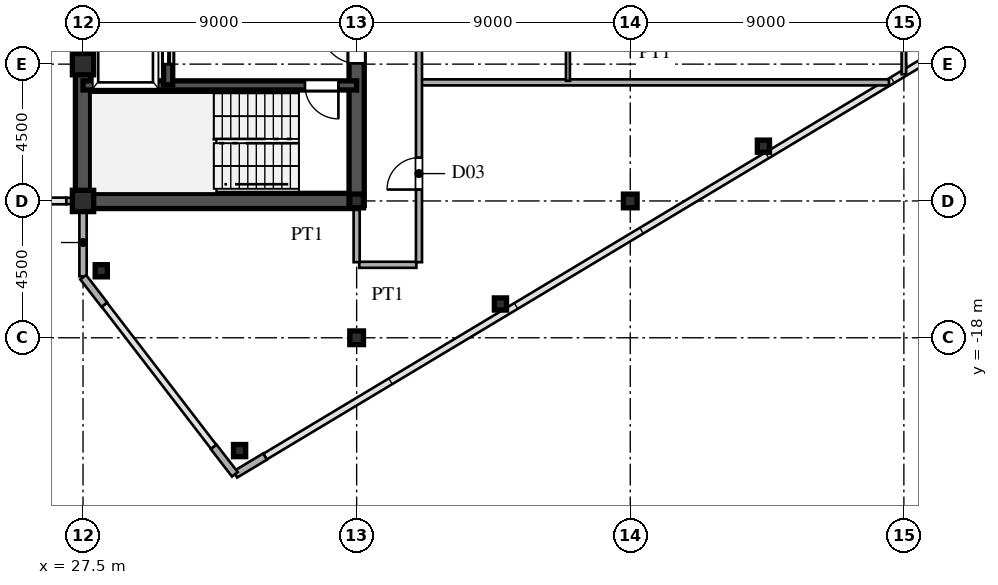
"""IFC4 building model, lengths in metres.
Left out: names, types, materials, properties, quantities, classifications, styles, units other than length and angle.
Written with IfcOpenShell. Run it as: python <this file> out.ifc"""

import sys

from ifc_helpers import new_model, si_unit, direction, frame, frame_2d, origin, origin_2d, place, context, subcontext, project, spatial, rectangle, hollow_rectangle, i_section, extrude, source, transform, mapped, element, fill, save


model = new_model("IFC4")
c1 = context("Model", 3, precision=1e-05, world=origin(), true_north=direction((0.0, 1.0)))
c2 = subcontext(c1, "Body", "Model", "MODEL_VIEW")
j1 = project(units=[si_unit("LENGTHUNIT", "METRE"), si_unit("PLANEANGLEUNIT", "RADIAN")], contexts=[c1])
p1 = place(None, origin())
s1 = spatial("IfcSite", under=j1, at=p1, CompositionType="ELEMENT")
p2 = place(p1, origin())
s2 = spatial("IfcBuilding", under=s1, at=p2, CompositionType="ELEMENT")
p3 = place(p2, frame((0.0, 0.0, 261.9)))
s3 = spatial("IfcBuildingStorey", under=s2, at=p3, CompositionType="ELEMENT", Elevation=261.9)
m1 = source(origin(), c2, "Body", "SweptSolid", [
    extrude(hollow_rectangle(XDim=0.7, YDim=0.7, WallThickness=0.03, at=origin_2d()), origin(), (0.0, 0.0, 1.0), 3.75),
])
for number, where, z_axis, x_axis in (
    (1, (27.5, -13.5, 0.0), (0.0, 0.0, 1.0), (1.0, 0.0, 0.0)),
    (2, (27.5, -9.0, 0.0), (0.0, 0.0, 1.0), (1.0, 0.0, 0.0)),
):
    element("IfcColumn", number, at=place(p3, frame(where, z_axis=z_axis, x_axis=x_axis)), inside=s3, PredefinedType="COLUMN", context=c2, shape_type="MappedRepresentation", body=[
        mapped(m1, transform((0.0, 0.0, 0.0), scale=1.0)),
    ])
m2 = source(origin(), c2, "Body", "SweptSolid", [
    extrude(i_section(OverallWidth=0.45, OverallDepth=0.45, WebThickness=0.016, FlangeThickness=0.025, at=origin_2d()), origin(), (0.0, 0.0, 1.0), 3.75),
])
for number, where, z_axis, x_axis in (
    (3, (36.5, -18.0, 0.0), (0.0, 0.0, 1.0), (1.0, 0.0, 0.0)),
    (4, (36.5, -13.5, 0.0), (0.0, 0.0, 1.0), (1.0, 0.0, 0.0)),
    (5, (45.5, -13.5, 0.0), (0.0, 0.0, 1.0), (1.0, 0.0, 0.0)),
):
    element("IfcColumn", number, at=place(p3, frame(where, z_axis=z_axis, x_axis=x_axis)), inside=s3, PredefinedType="COLUMN", context=c2, shape_type="MappedRepresentation", body=[
        mapped(m2, transform((0.0, 0.0, 0.0), scale=1.0)),
    ])
m3 = source(origin(), c2, "Body", "SweptSolid", [
    extrude(hollow_rectangle(XDim=0.4, YDim=0.4, WallThickness=0.016, at=origin_2d()), origin(), (0.0, 0.0, 1.0), 3.75),
])
for number, where, z_axis, x_axis in (
    (6, (32.65, -21.71, 0.0), (0.0, 0.0, 1.0), (1.0, 0.0, 0.0)),
    (7, (28.1, -15.796, 0.0), (0.0, 0.0, 1.0), (1.0, 0.0, 0.0)),
    (8, (41.23, -16.889, 0.0), (0.0, 0.0, 1.0), (1.0, 0.0, 0.0)),
    (9, (49.88, -11.699, 0.0), (0.0, 0.0, 1.0), (1.0, 0.0, 0.0)),
):
    element("IfcColumn", number, at=place(p3, frame(where, z_axis=z_axis, x_axis=x_axis)), inside=s3, PredefinedType="COLUMN", context=c2, shape_type="MappedRepresentation", body=[
        mapped(m3, transform((0.0, 0.0, 0.0), scale=1.0)),
    ])
p4 = place(p3, frame((32.509, -22.495, 0.0), z_axis=(0.0, 0.0, 1.0), x_axis=(0.85743623509, 0.514590228002, 0.0)))
e10 = element("IfcWall", 10, at=p4, inside=s3, PredefinedType="SOLIDWALL", context=c2, shape_type="SweptSolid", body=[
    extrude(rectangle(XDim=1.14, YDim=0.24, at=frame_2d((0.57, 0.0))), origin(), (0.0, 0.0, 1.0), 3.53),
])
p5 = place(p3, frame((27.5, -15.98, 0.0), z_axis=(0.0, 0.0, 1.0), x_axis=(0.0, 1.0, 0.0)))
e11 = element("IfcWall", 11, at=p5, inside=s3, PredefinedType="SOLIDWALL", context=c2, shape_type="SweptSolid", body=[
    extrude(rectangle(XDim=1.605, YDim=0.24, at=frame_2d((0.803, 0.0))), origin(), (0.0, 0.0, 1.0), 3.53),
])
p6 = place(p3, frame((27.5, -14.375, 0.0), z_axis=(0.0, 0.0, 1.0), x_axis=(0.0, 1.0, 0.0)))
e12 = element("IfcWall", 12, at=p6, inside=s3, PredefinedType="SOLIDWALL", context=c2, shape_type="SweptSolid", body=[
    extrude(rectangle(XDim=0.62, YDim=0.24, at=frame_2d((0.31, 0.0))), origin(), (0.0, 0.0, 1.0), 3.03),
])
for number, where, z_axis, x_axis in (
    (13, (27.506, -16.008, 0.0), (0.0, 0.0, 1.0), (0.61, -0.793, 0.0)),
    (14, (31.799, -21.588, 0.0), (0.0, 0.0, 1.0), (0.61, -0.793, 0.0)),
):
    element("IfcWall", number, at=place(p3, frame(where, z_axis=z_axis, x_axis=x_axis)), inside=s3, PredefinedType="SOLIDWALL", context=c2, shape_type="SweptSolid", body=[
        extrude(rectangle(XDim=1.14, YDim=0.24, at=frame_2d((0.57, 0.0))), origin(), (0.0, 0.0, 1.0), 3.53),
    ])
p7 = place(p3, frame((26.95, -13.5, 0.0), z_axis=(0.0, 0.0, 1.0), x_axis=(1.0, 0.0, 0.0)))
e15 = element("IfcWall", 15, at=p7, inside=s3, PredefinedType="SOLIDWALL", context=c2, shape_type="SweptSolid", body=[
    extrude(rectangle(XDim=0.54, YDim=0.21, at=frame_2d((0.27, 0.0))), origin(), (0.0, 0.0, 1.0), 3.03),
])
p8 = place(p3, frame((27.5, -13.5, 0.0), z_axis=(0.0, 0.0, 1.0), x_axis=(0.0, 1.0, 0.0)))
e16 = element("IfcWall", 16, at=p8, inside=s3, PredefinedType="SHEAR", context=c2, shape_type="SweptSolid", body=[
    extrude(rectangle(XDim=12.2, YDim=0.5, at=frame_2d((6.1, 0.0))), origin(), (0.0, 0.0, 1.0), 3.53),
])
p9 = place(p3, frame((27.5, -13.5, 0.0), z_axis=(0.0, 0.0, 1.0), x_axis=(1.0, 0.0, 0.0)))
e17 = element("IfcWall", 17, at=p9, inside=s3, PredefinedType="SHEAR", context=c2, shape_type="SweptSolid", body=[
    extrude(rectangle(XDim=9.0, YDim=0.5, at=frame_2d((4.5, 0.0))), origin(), (0.0, 0.0, 1.0), 3.53),
])
p10 = place(p3, frame((36.5, -13.65, 0.0), z_axis=(0.0, 0.0, 1.0), x_axis=(0.0, 1.0, 0.0)))
e18 = element("IfcWall", 18, at=p10, inside=s3, PredefinedType="SHEAR", context=c2, shape_type="SweptSolid", body=[
    extrude(rectangle(XDim=7.15, YDim=0.5, at=frame_2d((3.575, 0.0))), origin(), (0.0, 0.0, 1.0), 3.53),
])
p11 = place(p10, frame((4.675, 0.0, 0.0)))
e19 = element("IfcOpeningElement", 19, at=p11, cuts=e18, PredefinedType="OPENING", context=c2, shape_type="SweptSolid", body=[
    extrude(rectangle(XDim=1.15, YDim=2.2, at=frame_2d((0.575, 1.1))), frame((0.0, 0.26, 0.0), z_axis=(0.0, -1.0, 0.0), x_axis=(1.0, 0.0, 0.0)), (0.0, 0.0, 1.0), 0.52),
])
p12 = place(p3, frame((27.5, -9.7, 0.0), z_axis=(0.0, 0.0, 1.0), x_axis=(1.0, 0.0, 0.0)))
e20 = element("IfcWall", 20, at=p12, inside=s3, PredefinedType="SHEAR", context=c2, shape_type="SweptSolid", body=[
    extrude(rectangle(XDim=9.0, YDim=0.3, at=frame_2d((4.5, 0.0))), origin(), (0.0, 0.0, 1.0), 3.53),
])
p13 = place(p12, frame((7.3, 0.0, 0.0)))
e21 = element("IfcOpeningElement", 21, at=p13, cuts=e20, PredefinedType="OPENING", context=c2, shape_type="SweptSolid", body=[
    extrude(rectangle(XDim=1.1, YDim=2.2, at=frame_2d((0.55, 1.1))), frame((0.0, 0.16, 0.0), z_axis=(0.0, -1.0, 0.0), x_axis=(1.0, 0.0, 0.0)), (0.0, 0.0, 1.0), 0.32),
])
p14 = place(p3, frame((30.3, -9.68, 0.0), z_axis=(0.0, 0.0, 1.0), x_axis=(0.0, 1.0, 0.0)))
e22 = element("IfcWall", 22, at=p14, inside=s3, PredefinedType="SHEAR", context=c2, shape_type="SweptSolid", body=[
    extrude(rectangle(XDim=2.56, YDim=0.3, at=frame_2d((1.28, 0.0))), origin(), (0.0, 0.0, 1.0), 3.53),
])
p15 = place(p14, frame((0.68, 0.0, 0.0)))
e23 = element("IfcOpeningElement", 23, at=p15, cuts=e22, PredefinedType="OPENING", context=c2, shape_type="SweptSolid", body=[
    extrude(rectangle(XDim=1.2, YDim=2.25, at=frame_2d((0.6, 1.125))), frame((0.0, 0.16, 0.0), z_axis=(0.0, -1.0, 0.0), x_axis=(1.0, 0.0, 0.0)), (0.0, 0.0, 1.0), 0.32),
])
p16 = place(p3, frame((36.585, -15.6, 0.0), z_axis=(0.0, 0.0, 1.0), x_axis=(1.0, 0.0, 0.0)))
e24 = element("IfcWall", 24, at=p16, inside=s3, PredefinedType="PARTITIONING", context=c2, shape_type="SweptSolid", body=[
    extrude(rectangle(XDim=1.88, YDim=0.2, at=frame_2d((0.94, 0.0))), origin(), (0.0, 0.0, 1.0), 3.53),
])
p17 = place(p3, frame((38.63, -9.6, 0.0), z_axis=(0.0, 0.0, 1.0), x_axis=(1.0, 0.0, 0.0)))
e25 = element("IfcWall", 25, at=p17, inside=s3, PredefinedType="PARTITIONING", context=c2, shape_type="SweptSolid", body=[
    extrude(rectangle(XDim=15.38, YDim=0.2, at=frame_2d((7.69, 0.0))), origin(), (0.0, 0.0, 1.0), 3.53),
])
p18 = place(p3, frame((36.5, -15.515, 0.0), z_axis=(0.0, 0.0, 1.0), x_axis=(0.0, 1.0, 0.0)))
e26 = element("IfcWall", 26, at=p18, inside=s3, PredefinedType="PARTITIONING", context=c2, shape_type="SweptSolid", body=[
    extrude(rectangle(XDim=1.76, YDim=0.2, at=frame_2d((0.88, 0.0))), origin(), (0.0, 0.0, 1.0), 2.93),
])
p19 = place(p3, frame((38.55, -15.515, 0.0), z_axis=(0.0, 0.0, 1.0), x_axis=(0.0, 1.0, 0.0)))
e27 = element("IfcWall", 27, at=p19, inside=s3, PredefinedType="PARTITIONING", context=c2, shape_type="SweptSolid", body=[
    extrude(rectangle(XDim=31.03, YDim=0.2, at=frame_2d((15.515, 0.0))), origin(), (0.0, 0.0, 1.0), 3.53),
])
p20 = place(p19, frame((2.39, 0.0, 0.0)))
e28 = element("IfcOpeningElement", 28, at=p20, cuts=e27, PredefinedType="OPENING", context=c2, shape_type="SweptSolid", body=[
    extrude(rectangle(XDim=1.05, YDim=2.25, at=frame_2d((0.525, 1.125))), frame((0.0, 0.11, 0.0), z_axis=(0.0, -1.0, 0.0), x_axis=(1.0, 0.0, 0.0)), (0.0, 0.0, 1.0), 0.22),
])
p21 = place(p19, frame((11.889, 0.0, 0.0)))
e29 = element("IfcOpeningElement", 29, at=p21, cuts=e27, PredefinedType="OPENING", context=c2, shape_type="SweptSolid", body=[
    extrude(rectangle(XDim=1.05, YDim=2.25, at=frame_2d((0.525, 1.125))), frame((0.0, 0.11, 0.0), z_axis=(0.0, -1.0, 0.0), x_axis=(1.0, 0.0, 0.0)), (0.0, 0.0, 1.0), 0.22),
])
p22 = place(p19, frame((24.69, 0.0, 0.0)))
e30 = element("IfcOpeningElement", 30, at=p22, cuts=e27, PredefinedType="OPENING", context=c2, shape_type="SweptSolid", body=[
    extrude(rectangle(XDim=1.05, YDim=2.25, at=frame_2d((0.525, 1.125))), frame((0.0, 0.11, 0.0), z_axis=(0.0, -1.0, 0.0), x_axis=(1.0, 0.0, 0.0)), (0.0, 0.0, 1.0), 0.22),
])
p23 = place(p3, frame((43.45, -9.55, 0.0), z_axis=(0.0, 0.0, 1.0), x_axis=(0.0, 1.0, 0.0)))
e31 = element("IfcWall", 31, at=p23, inside=s3, PredefinedType="PARTITIONING", context=c2, shape_type="SweptSolid", body=[
    extrude(rectangle(XDim=8.833, YDim=0.13, at=frame_2d((4.417, 0.0))), origin(), (0.0, 0.0, 1.0), 3.53),
])
p24 = place(p23, frame((6.175, 0.0, 0.0)))
e32 = element("IfcOpeningElement", 32, at=p24, cuts=e31, PredefinedType="OPENING", context=c2, shape_type="SweptSolid", body=[
    extrude(rectangle(XDim=0.95, YDim=2.15, at=frame_2d((0.475, 1.075))), frame((0.0, 0.075, 0.0), z_axis=(0.0, -1.0, 0.0), x_axis=(1.0, 0.0, 0.0)), (0.0, 0.0, 1.0), 0.15),
])
p25 = place(p3, frame((54.5, -9.335, 0.0), z_axis=(0.0, 0.0, 1.0), x_axis=(0.0, 1.0, 0.0)))
e33 = element("IfcWall", 33, at=p25, inside=s3, PredefinedType="PARTITIONING", context=c2, shape_type="SweptSolid", body=[
    extrude(rectangle(XDim=13.085, YDim=0.15, at=frame_2d((6.542, 0.0))), origin(), (0.0, 0.0, 1.0), 2.93),
])
p26 = place(p25, frame((5.96, 0.0, 0.0)))
e34 = element("IfcOpeningElement", 34, at=p26, cuts=e33, PredefinedType="OPENING", context=c2, shape_type="SweptSolid", body=[
    extrude(rectangle(XDim=0.95, YDim=2.15, at=frame_2d((0.475, 1.075))), frame((0.0, 0.085, 0.0), z_axis=(0.0, -1.0, 0.0), x_axis=(1.0, 0.0, 0.0)), (0.0, 0.0, 1.0), 0.17),
])
p27 = place(p25, frame((1.643, 0.0, 0.0)))
e35 = element("IfcOpeningElement", 35, at=p27, cuts=e33, PredefinedType="OPENING", context=c2, shape_type="SweptSolid", body=[
    extrude(rectangle(XDim=0.95, YDim=2.15, at=frame_2d((0.475, 1.075))), frame((0.0, 0.085, 0.0), z_axis=(0.0, -1.0, 0.0), x_axis=(1.0, 0.0, 0.0)), (0.0, 0.0, 1.0), 0.17),
])
p28 = place(p25, frame((10.427, 0.0, 0.0)))
e36 = element("IfcOpeningElement", 36, at=p28, cuts=e33, PredefinedType="OPENING", context=c2, shape_type="SweptSolid", body=[
    extrude(rectangle(XDim=0.95, YDim=2.15, at=frame_2d((0.475, 1.075))), frame((0.0, 0.085, 0.0), z_axis=(0.0, -1.0, 0.0), x_axis=(1.0, 0.0, 0.0)), (0.0, 0.0, 1.0), 0.17),
])
m4 = source(origin(), c2, "Body", "SweptSolid", [
    extrude(rectangle(XDim=1.15, YDim=2.2, at=frame_2d((0.575, 1.1))), frame((0.0, 0.025, 0.0), z_axis=(0.0, -1.0, 0.0), x_axis=(1.0, 0.0, 0.0)), (0.0, 0.0, 1.0), 0.05),
])
p29 = place(p11, origin())
e37 = element("IfcDoor", 37, at=p29, inside=s3, OperationType="SINGLE_SWING_RIGHT", PredefinedType="DOOR", context=c2, shape_type="MappedRepresentation", body=[
    mapped(m4, transform((0.0, 0.0, 0.0), scale=1.0)),
])
fill(e19, e37)
m5 = source(origin(), c2, "Body", "SweptSolid", [
    extrude(rectangle(XDim=1.1, YDim=2.2, at=frame_2d((0.55, 1.1))), frame((0.0, 0.025, 0.0), z_axis=(0.0, -1.0, 0.0), x_axis=(1.0, 0.0, 0.0)), (0.0, 0.0, 1.0), 0.05),
])
p30 = place(p13, frame((1.1, 0.0, 0.0), z_axis=(0.0, 0.0, 1.0), x_axis=(-1.0, 0.0, 0.0)))
e38 = element("IfcDoor", 38, at=p30, inside=s3, OperationType="SINGLE_SWING_RIGHT", PredefinedType="DOOR", context=c2, shape_type="MappedRepresentation", body=[
    mapped(m5, transform((0.0, 0.0, 0.0), scale=1.0)),
])
fill(e21, e38)
m6 = source(origin(), c2, "Body", "SweptSolid", [
    extrude(rectangle(XDim=1.2, YDim=2.25, at=frame_2d((0.6, 1.125))), frame((0.0, 0.025, 0.0), z_axis=(0.0, -1.0, 0.0), x_axis=(1.0, 0.0, 0.0)), (0.0, 0.0, 1.0), 0.05),
])
p31 = place(p15, origin())
e39 = element("IfcDoor", 39, at=p31, inside=s3, OperationType="DOUBLE_DOOR_SLIDING", PredefinedType="DOOR", context=c2, shape_type="MappedRepresentation", body=[
    mapped(m6, transform((0.0, 0.0, 0.0), scale=1.0)),
])
fill(e23, e39)
m7 = source(origin(), c2, "Body", "SweptSolid", [
    extrude(rectangle(XDim=1.05, YDim=2.25, at=frame_2d((0.525, 1.125))), frame((0.0, 0.025, 0.0), z_axis=(0.0, -1.0, 0.0), x_axis=(1.0, 0.0, 0.0)), (0.0, 0.0, 1.0), 0.05),
])
p32 = place(p20, origin())
e40 = element("IfcDoor", 40, at=p32, inside=s3, OperationType="SINGLE_SWING_LEFT", PredefinedType="DOOR", context=c2, shape_type="MappedRepresentation", body=[
    mapped(m7, transform((0.0, 0.0, 0.0), scale=1.0)),
])
fill(e28, e40)
save(model, sys.argv[1])
